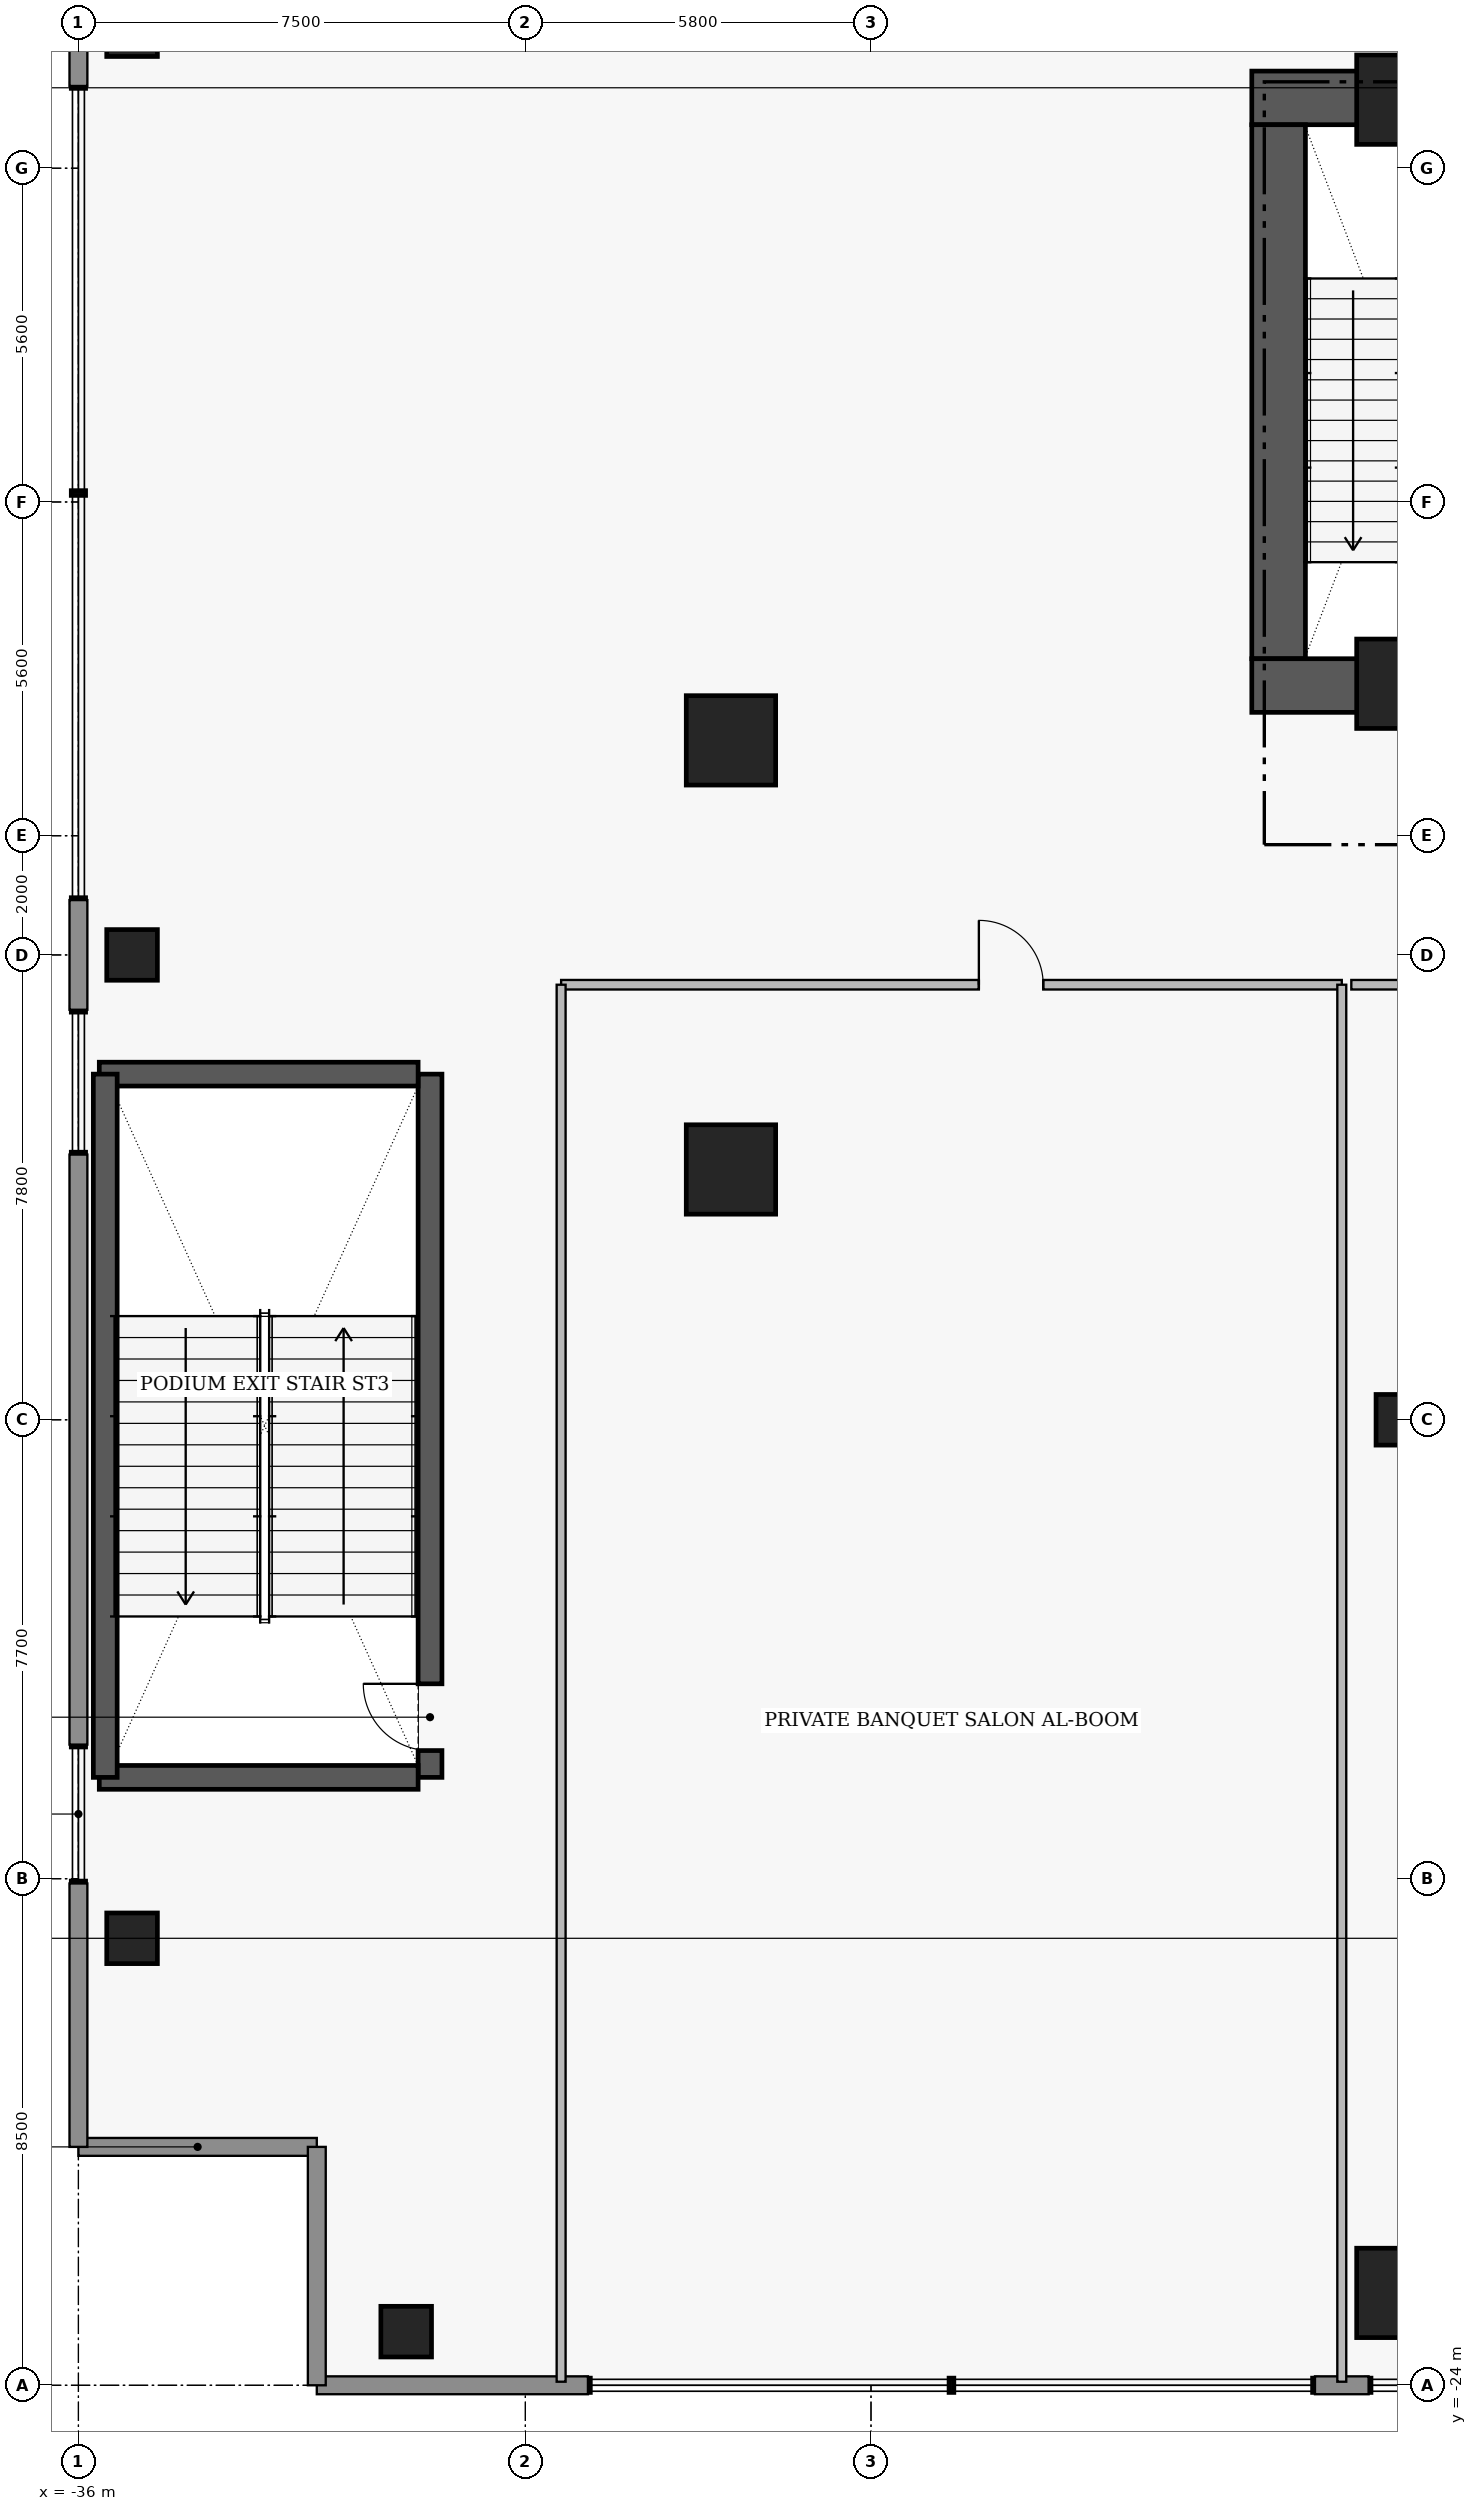
"""IFC4 building model, lengths in metres.
Left out: names, types, materials, properties, quantities, classifications, styles, units other than length and angle.
Written with IfcOpenShell. Run it as: python <this file> out.ifc"""

import sys

from ifc_helpers import new_model, si_unit, direction, frame, frame_2d, origin, origin_2d, place, context, subcontext, project, spatial, rectangle, extrude, element, fill, save


model = new_model("IFC4")
c1 = context("Model", 3, precision=1e-05, world=origin(), true_north=direction((0.0, 1.0)))
c2 = subcontext(c1, "Body", "Model", "MODEL_VIEW")
j1 = project(units=[si_unit("LENGTHUNIT", "METRE"), si_unit("PLANEANGLEUNIT", "RADIAN")], contexts=[c1])
p1 = place(None, origin())
s1 = spatial("IfcSite", under=j1, at=p1, CompositionType="ELEMENT")
p2 = place(p1, origin())
s2 = spatial("IfcBuilding", under=s1, at=p2, CompositionType="ELEMENT")
p3 = place(p2, frame((0.0, 0.0, 6.0)))
s3 = spatial("IfcBuildingStorey", under=s2, at=p3, CompositionType="ELEMENT", Elevation=6.0)
p4 = place(p3, frame((-16.31, 14.38, 0.0), z_axis=(0.0, 0.0, 1.0), x_axis=(1.0, 0.0, 0.0)))
e1 = element("IfcWall", 1, at=p4, inside=s3, PredefinedType="SHEAR", context=c2, shape_type="SweptSolid", body=[
    extrude(rectangle(XDim=4.71, YDim=0.9, at=frame_2d((2.355, 0.0))), origin(), (0.0, 0.0, 1.0), 5.21),
])
p5 = place(p3, frame((-15.86, 4.97, 0.0), z_axis=(0.0, 0.0, 1.0), x_axis=(0.0, 1.0, 0.0)))
e2 = element("IfcWall", 2, at=p5, inside=s3, PredefinedType="SHEAR", context=c2, shape_type="SweptSolid", body=[
    extrude(rectangle(XDim=8.96, YDim=0.9, at=frame_2d((4.48, 0.0))), origin(), (0.0, 0.0, 1.0), 5.21),
])
p6 = place(p3, frame((-16.31, 4.52, 0.0), z_axis=(0.0, 0.0, 1.0), x_axis=(1.0, 0.0, 0.0)))
e3 = element("IfcWall", 3, at=p6, inside=s3, PredefinedType="SHEAR", context=c2, shape_type="SweptSolid", body=[
    extrude(rectangle(XDim=4.71, YDim=0.9, at=frame_2d((2.355, 0.0))), origin(), (0.0, 0.0, 1.0), 5.21),
])
p7 = place(p3, frame((-30.1, -13.8, 0.0), z_axis=(0.0, 0.0, 1.0), x_axis=(0.0, 1.0, 0.0)))
e4 = element("IfcWall", 4, at=p7, inside=s3, PredefinedType="SHEAR", context=c2, shape_type="SweptSolid", body=[
    extrude(rectangle(XDim=11.8, YDim=0.4, at=frame_2d((5.9, 0.0))), origin(), (0.0, 0.0, 1.0), 5.21),
])
p8 = place(p7, frame((0.45, 0.0, 0.0)))
e5 = element("IfcOpeningElement", 5, at=p8, cuts=e4, PredefinedType="OPENING", context=c2, shape_type="SweptSolid", body=[
    extrude(rectangle(XDim=1.12, YDim=2.22, at=frame_2d((0.56, 1.11))), frame((0.0, 0.21, 0.0), z_axis=(0.0, -1.0, 0.0), x_axis=(1.0, 0.0, 0.0)), (0.0, 0.0, 1.0), 0.42),
])
for number, where, z_axis, x_axis in (
    (6, (-35.65, -13.8, 0.0), (0.0, 0.0, 1.0), (1.0, 0.0, 0.0)),
    (7, (-35.65, -2.0, 0.0), (0.0, 0.0, 1.0), (1.0, 0.0, 0.0)),
):
    element("IfcWall", number, at=place(p3, frame(where, z_axis=z_axis, x_axis=x_axis)), inside=s3, PredefinedType="SHEAR", context=c2, shape_type="SweptSolid", body=[
        extrude(rectangle(XDim=5.35, YDim=0.4, at=frame_2d((2.675, 0.0))), origin(), (0.0, 0.0, 1.0), 5.21),
    ])
p9 = place(p3, frame((-35.55, -13.8, 0.0), z_axis=(0.0, 0.0, 1.0), x_axis=(0.0, 1.0, 0.0)))
e8 = element("IfcWall", 8, at=p9, inside=s3, PredefinedType="SHEAR", context=c2, shape_type="SweptSolid", body=[
    extrude(rectangle(XDim=11.8, YDim=0.4, at=frame_2d((5.9, 0.0))), origin(), (0.0, 0.0, 1.0), 5.21),
])
for number, where, z_axis, x_axis in (
    (9, (-13.8, 14.35, 0.0), (0.0, 0.0, 1.0), (1.0, 0.0, 0.0)),
    (10, (-13.8, 4.55, 0.0), (0.0, 0.0, 1.0), (1.0, 0.0, 0.0)),
    (11, (-13.8, -22.45, 0.0), (0.0, 0.0, 1.0), (1.0, 0.0, 0.0)),
    (12, (-25.05, -3.6, 0.0), (0.0, 0.0, 1.0), (1.0, 0.0, 0.0)),
    (13, (-25.05, 3.6, 0.0), (0.0, 0.0, 1.0), (1.0, 0.0, 0.0)),
):
    element("IfcColumn", number, at=place(p3, frame(where, z_axis=z_axis, x_axis=x_axis)), inside=s3, PredefinedType="COLUMN", context=c2, shape_type="SweptSolid", body=[
        extrude(rectangle(XDim=1.5, YDim=1.5, at=origin_2d()), origin(), (0.0, 0.0, 1.0), 5.4),
    ])
for number, where, z_axis, x_axis in (
    (14, (-30.5, -23.1, 0.0), (0.0, 0.0, 1.0), (1.0, 0.0, 0.0)),
    (15, (-35.1, -16.5, 0.0), (0.0, 0.0, 1.0), (1.0, 0.0, 0.0)),
    (16, (-35.1, 0.0, 0.0), (0.0, 0.0, 1.0), (1.0, 0.0, 0.0)),
    (17, (-35.1, 15.5, 0.0), (0.0, 0.0, 1.0), (1.0, 0.0, 0.0)),
    (18, (-13.8, -7.8, 0.0), (0.0, 0.0, 1.0), (1.0, 0.0, 0.0)),
):
    element("IfcColumn", number, at=place(p3, frame(where, z_axis=z_axis, x_axis=x_axis)), inside=s3, PredefinedType="COLUMN", context=c2, shape_type="SweptSolid", body=[
        extrude(rectangle(XDim=0.85, YDim=0.85, at=origin_2d()), origin(), (0.0, 0.0, 1.0), 5.4),
    ])
p10 = place(p3, frame((-32.0, -20.0, 0.0), z_axis=(0.0, 0.0, 1.0), x_axis=(-1.0, 0.0, 0.0)))
e19 = element("IfcWall", 19, at=p10, inside=s3, PredefinedType="STANDARD", context=c2, shape_type="SweptSolid", body=[
    extrude(rectangle(XDim=4.0, YDim=0.3, at=frame_2d((2.0, 0.0))), origin(), (0.0, 0.0, 1.0), 5.14),
])
p11 = place(p3, frame((-36.0, -20.0, 0.0), z_axis=(0.0, 0.0, 1.0), x_axis=(0.0, 1.0, 0.0)))
e20 = element("IfcWall", 20, at=p11, inside=s3, PredefinedType="STANDARD", context=c2, shape_type="SweptSolid", body=[
    extrude(rectangle(XDim=4.42, YDim=0.3, at=frame_2d((2.21, 0.0))), origin(), (0.0, 0.0, 1.0), 5.14),
])
p12 = place(p3, frame((-36.0, -13.25, 0.0), z_axis=(0.0, 0.0, 1.0), x_axis=(0.0, 1.0, 0.0)))
e21 = element("IfcWall", 21, at=p12, inside=s3, PredefinedType="STANDARD", context=c2, shape_type="SweptSolid", body=[
    extrude(rectangle(XDim=9.9, YDim=0.3, at=frame_2d((4.95, 0.0))), origin(), (0.0, 0.0, 1.0), 5.14),
])
for number, where, z_axis, x_axis in (
    (22, (-36.0, -0.92, 0.0), (0.0, 0.0, 1.0), (0.0, 1.0, 0.0)),
    (23, (-36.0, 14.58, 0.0), (0.0, 0.0, 1.0), (0.0, 1.0, 0.0)),
):
    element("IfcWall", number, at=place(p3, frame(where, z_axis=z_axis, x_axis=x_axis)), inside=s3, PredefinedType="STANDARD", context=c2, shape_type="SweptSolid", body=[
        extrude(rectangle(XDim=1.84, YDim=0.3, at=frame_2d((0.92, 0.0))), origin(), (0.0, 0.0, 1.0), 5.14),
    ])
p13 = place(p3, frame((-14.35, -24.0, 0.0), z_axis=(0.0, 0.0, 1.0), x_axis=(-1.0, 0.0, 0.0)))
e24 = element("IfcWall", 24, at=p13, inside=s3, PredefinedType="STANDARD", context=c2, shape_type="SweptSolid", body=[
    extrude(rectangle(XDim=0.9, YDim=0.3, at=frame_2d((0.45, 0.0))), origin(), (0.0, 0.0, 1.0), 5.14),
])
p14 = place(p3, frame((-27.45, -24.0, 0.0), z_axis=(0.0, 0.0, 1.0), x_axis=(-1.0, 0.0, 0.0)))
e25 = element("IfcWall", 25, at=p14, inside=s3, PredefinedType="STANDARD", context=c2, shape_type="SweptSolid", body=[
    extrude(rectangle(XDim=4.55, YDim=0.3, at=frame_2d((2.275, 0.0))), origin(), (0.0, 0.0, 1.0), 5.14),
])
p15 = place(p3, frame((-32.0, -24.0, 0.0), z_axis=(0.0, 0.0, 1.0), x_axis=(0.0, 1.0, 0.0)))
e26 = element("IfcWall", 26, at=p15, inside=s3, PredefinedType="STANDARD", context=c2, shape_type="SweptSolid", body=[
    extrude(rectangle(XDim=4.0, YDim=0.3, at=frame_2d((2.0, 0.0))), origin(), (0.0, 0.0, 1.0), 5.14),
])
p16 = place(p3, frame((-27.9, -0.5, 0.0), z_axis=(0.0, 0.0, 1.0), x_axis=(1.0, 0.0, 0.0)))
e27 = element("IfcWall", 27, at=p16, inside=s3, PredefinedType="PARTITIONING", context=c2, shape_type="SweptSolid", body=[
    extrude(rectangle(XDim=13.1, YDim=0.16, at=frame_2d((6.55, 0.0))), origin(), (0.0, 0.0, 1.0), 5.14),
])
p17 = place(p16, frame((7.01, 0.0, 0.0)))
e28 = element("IfcOpeningElement", 28, at=p17, cuts=e27, PredefinedType="OPENING", context=c2, shape_type="SweptSolid", body=[
    extrude(rectangle(XDim=1.08, YDim=2.18, at=frame_2d((0.54, 1.09))), frame((0.0, 0.09, 0.0), z_axis=(0.0, -1.0, 0.0), x_axis=(1.0, 0.0, 0.0)), (0.0, 0.0, 1.0), 0.18),
])
p18 = place(p3, frame((-14.64, -0.5, 0.0), z_axis=(0.0, 0.0, 1.0), x_axis=(1.0, 0.0, 0.0)))
e29 = element("IfcWall", 29, at=p18, inside=s3, PredefinedType="PARTITIONING", context=c2, shape_type="SweptSolid", body=[
    extrude(rectangle(XDim=29.28, YDim=0.16, at=frame_2d((14.64, 0.0))), origin(), (0.0, 0.0, 1.0), 5.14),
])
p19 = place(p18, frame((14.1, 0.0, 0.0)))
e30 = element("IfcOpeningElement", 30, at=p19, cuts=e29, PredefinedType="OPENING", context=c2, shape_type="SweptSolid", body=[
    extrude(rectangle(XDim=1.08, YDim=2.18, at=frame_2d((0.54, 1.09))), frame((0.0, 0.09, 0.0), z_axis=(0.0, -1.0, 0.0), x_axis=(1.0, 0.0, 0.0)), (0.0, 0.0, 1.0), 0.18),
])
for number, where, z_axis, x_axis in (
    (31, (-27.9, -23.94, 0.0), (0.0, 0.0, 1.0), (0.0, 1.0, 0.0)),
    (32, (-14.8, -23.94, 0.0), (0.0, 0.0, 1.0), (0.0, 1.0, 0.0)),
):
    element("IfcWall", number, at=place(p3, frame(where, z_axis=z_axis, x_axis=x_axis)), inside=s3, PredefinedType="PARTITIONING", context=c2, shape_type="SweptSolid", body=[
        extrude(rectangle(XDim=23.44, YDim=0.15, at=frame_2d((11.72, 0.0))), origin(), (0.0, 0.0, 1.0), 5.14),
    ])
p20 = place(p8, origin())
e33 = element("IfcDoor", 33, at=p20, inside=s3, OperationType="SINGLE_SWING_RIGHT", PredefinedType="DOOR", context=c2, shape_type="SweptSolid", body=[
    extrude(rectangle(XDim=1.12, YDim=2.22, at=frame_2d((0.56, 1.11))), frame((0.0, 0.025, 0.0), z_axis=(0.0, -1.0, 0.0), x_axis=(1.0, 0.0, 0.0)), (0.0, 0.0, 1.0), 0.05),
])
fill(e5, e33)
p21 = place(p17, origin())
e34 = element("IfcDoor", 34, at=p21, inside=s3, OperationType="SINGLE_SWING_LEFT", PredefinedType="DOOR", context=c2, shape_type="SweptSolid", body=[
    extrude(rectangle(XDim=1.08, YDim=2.18, at=frame_2d((0.54, 1.09))), frame((0.0, 0.025, 0.0), z_axis=(0.0, -1.0, 0.0), x_axis=(1.0, 0.0, 0.0)), (0.0, 0.0, 1.0), 0.05),
])
fill(e28, e34)
save(model, sys.argv[1])
